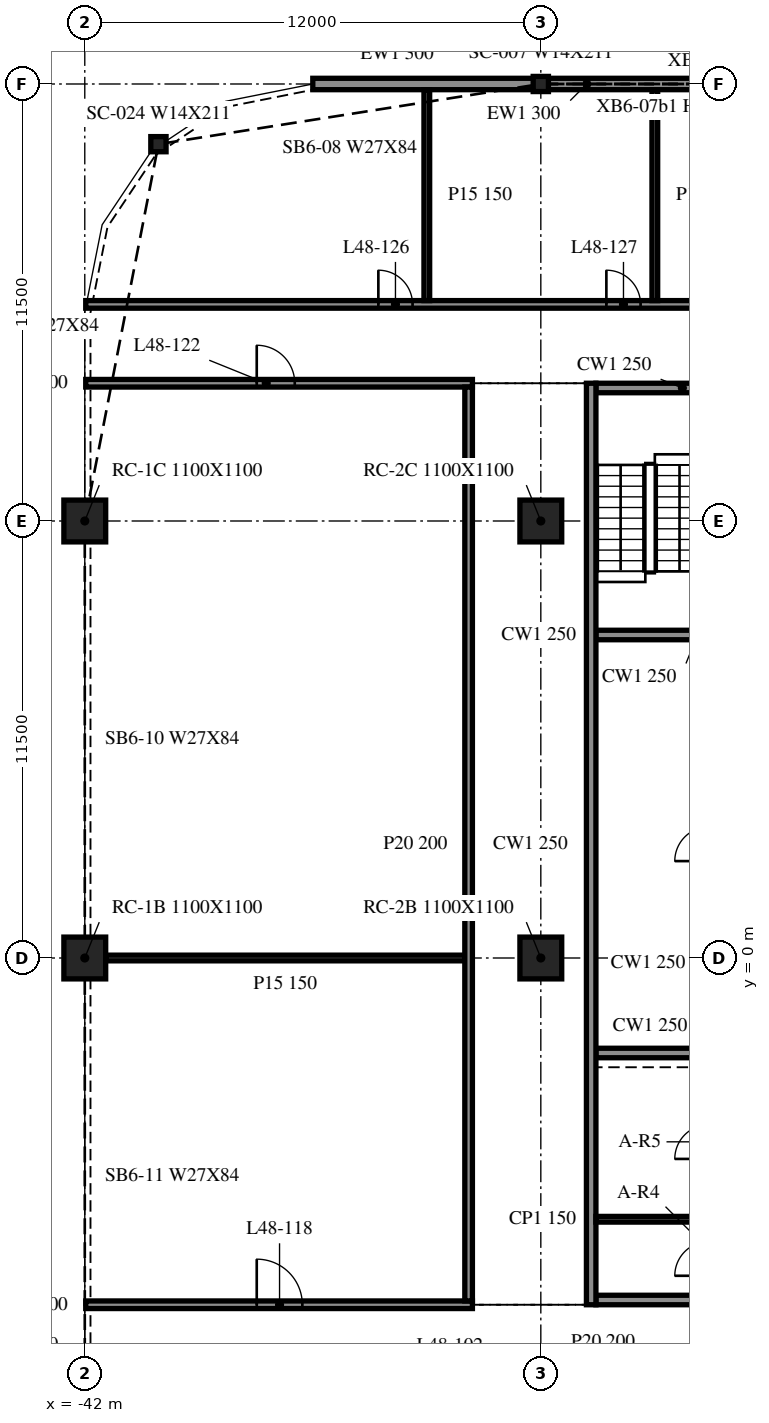
"""IFC4 building model, lengths in metres.
Left out: names, types, materials, properties, quantities, classifications, styles, units other than length and angle.
Written with IfcOpenShell. Run it as: python <this file> out.ifc"""

import sys

from ifc_helpers import new_model, si_unit, direction, frame, frame_2d, origin, origin_2d, place, context, subcontext, project, spatial, rectangle, i_section, extrude, element, fill, save


model = new_model("IFC4")
c1 = context("Model", 3, precision=1e-05, world=origin(), true_north=direction((0.0, 1.0)))
c2 = subcontext(c1, "Body", "Model", "MODEL_VIEW")
j1 = project(units=[si_unit("LENGTHUNIT", "METRE"), si_unit("PLANEANGLEUNIT", "RADIAN")], contexts=[c1])
p1 = place(None, origin())
s1 = spatial("IfcSite", under=j1, at=p1, CompositionType="ELEMENT")
p2 = place(p1, origin())
s2 = spatial("IfcBuilding", under=s1, at=p2, CompositionType="ELEMENT")
p3 = place(p2, frame((0.0, 0.0, 201.5)))
s3 = spatial("IfcBuildingStorey", under=s2, at=p3, CompositionType="ELEMENT", Elevation=201.5)
for number, where, z_axis, x_axis in (
    (1, (-42.0, 0.0, -0.34), (0.0, 0.0, 1.0), (1.0, 0.0, 0.0)),
    (2, (-42.0, 11.5, -0.34), (0.0, 0.0, 1.0), (1.0, 0.0, 0.0)),
    (3, (-30.0, 0.0, -0.34), (0.0, 0.0, 1.0), (1.0, 0.0, 0.0)),
    (4, (-30.0, 11.5, -0.34), (0.0, 0.0, 1.0), (1.0, 0.0, 0.0)),
):
    element("IfcColumn", number, at=place(p3, frame(where, z_axis=z_axis, x_axis=x_axis)), inside=s3, PredefinedType="COLUMN", context=c2, shape_type="SweptSolid", body=[
        extrude(rectangle(XDim=1.1, YDim=1.1, at=origin_2d()), origin(), (0.0, 0.0, 1.0), 3.8),
    ])
for number, where, z_axis, x_axis in (
    (5, (-30.0, 23.0, -0.34), (0.0, 0.0, 1.0), (1.0, 0.0, 0.0)),
    (6, (-40.062, 21.416, -0.34), (0.0, 0.0, 1.0), (1.0, 0.0, 0.0)),
):
    element("IfcColumn", number, at=place(p3, frame(where, z_axis=z_axis, x_axis=x_axis)), inside=s3, PredefinedType="COLUMN", context=c2, shape_type="SweptSolid", body=[
        extrude(i_section(OverallWidth=0.401, OverallDepth=0.399, WebThickness=0.025, FlangeThickness=0.04, at=origin_2d()), origin(), (0.0, 0.0, 1.0), 3.8),
    ])
p4 = place(p3, frame((-18.012, 23.0, 0.0), z_axis=(0.0, 0.0, 1.0), x_axis=(-1.0, 0.0, 0.0)))
e7 = element("IfcWall", 7, at=p4, inside=s3, PredefinedType="NOTDEFINED", context=c2, shape_type="SweptSolid", body=[
    extrude(rectangle(XDim=11.975, YDim=0.3, at=frame_2d((5.988, 0.0))), origin(), (0.0, 0.0, 1.0), 2.782),
])
p5 = place(p3, frame((-30.012, 23.0, 0.0), z_axis=(0.0, 0.0, 1.0), x_axis=(-1.0, 0.0, 0.0)))
e8 = element("IfcWall", 8, at=p5, inside=s3, PredefinedType="NOTDEFINED", context=c2, shape_type="SweptSolid", body=[
    extrude(rectangle(XDim=5.988, YDim=0.3, at=frame_2d((2.994, 0.0))), origin(), (0.0, 0.0, 1.0), 2.782),
])
p6 = place(p3, frame((-28.675, 15.125, 0.0), z_axis=(0.0, 0.0, 1.0), x_axis=(0.0, -1.0, 0.0)))
e9 = element("IfcWall", 9, at=p6, inside=s3, PredefinedType="SOLIDWALL", context=c2, shape_type="SweptSolid", body=[
    extrude(rectangle(XDim=24.25, YDim=0.25, at=frame_2d((12.125, 0.0))), origin(), (0.0, 0.0, 1.0), 3.46),
])
p7 = place(p3, frame((-19.45, -9.0, 0.0), z_axis=(0.0, 0.0, 1.0), x_axis=(-1.0, 0.0, 0.0)))
e10 = element("IfcWall", 10, at=p7, inside=s3, PredefinedType="SOLIDWALL", context=c2, shape_type="SweptSolid", body=[
    extrude(rectangle(XDim=9.1, YDim=0.25, at=frame_2d((4.55, 0.0))), origin(), (0.0, 0.0, 1.0), 3.46),
])
p8 = place(p7, frame((3.65, 0.0, 0.0)))
e11 = element("IfcOpeningElement", 11, at=p8, cuts=e10, PredefinedType="OPENING", context=c2, shape_type="SweptSolid", body=[
    extrude(rectangle(XDim=1.8, YDim=2.1, at=frame_2d((0.9, 1.05))), frame((0.0, 0.135, 0.0), z_axis=(0.0, -1.0, 0.0), x_axis=(1.0, 0.0, 0.0)), (0.0, 0.0, 1.0), 0.27),
])
p9 = place(p3, frame((-28.55, 15.0, 0.0), z_axis=(0.0, 0.0, 1.0), x_axis=(1.0, 0.0, 0.0)))
e12 = element("IfcWall", 12, at=p9, inside=s3, PredefinedType="SOLIDWALL", context=c2, shape_type="SweptSolid", body=[
    extrude(rectangle(XDim=9.1, YDim=0.25, at=frame_2d((4.55, 0.0))), origin(), (0.0, 0.0, 1.0), 3.46),
])
p10 = place(p9, frame((3.65, 0.0, 0.0)))
e13 = element("IfcOpeningElement", 13, at=p10, cuts=e12, PredefinedType="OPENING", context=c2, shape_type="SweptSolid", body=[
    extrude(rectangle(XDim=1.8, YDim=2.1, at=frame_2d((0.9, 1.05))), frame((0.0, 0.135, 0.0), z_axis=(0.0, -1.0, 0.0), x_axis=(1.0, 0.0, 0.0)), (0.0, 0.0, 1.0), 0.27),
])
for number, where, z_axis, x_axis in (
    (14, (-28.55, -2.5, 0.0), (0.0, 0.0, 1.0), (1.0, 0.0, 0.0)),
    (15, (-28.55, 8.5, 0.0), (0.0, 0.0, 1.0), (1.0, 0.0, 0.0)),
):
    element("IfcWall", number, at=place(p3, frame(where, z_axis=z_axis, x_axis=x_axis)), inside=s3, PredefinedType="SOLIDWALL", context=c2, shape_type="SweptSolid", body=[
        extrude(rectangle(XDim=2.85, YDim=0.25, at=frame_2d((1.425, 0.0))), origin(), (0.0, 0.0, 1.0), 3.46),
    ])
p11 = place(p3, frame((-28.55, -6.875, 0.0), z_axis=(0.0, 0.0, 1.0), x_axis=(1.0, 0.0, 0.0)))
e16 = element("IfcWall", 16, at=p11, inside=s3, PredefinedType="PARTITIONING", context=c2, shape_type="SweptSolid", body=[
    extrude(rectangle(XDim=2.85, YDim=0.15, at=frame_2d((1.425, 0.0))), origin(), (0.0, 0.0, 1.0), 3.46),
])
p12 = place(p3, frame((-41.975, -9.125, 0.0), z_axis=(0.0, 0.0, 1.0), x_axis=(1.0, 0.0, 0.0)))
e17 = element("IfcWall", 17, at=p12, inside=s3, PredefinedType="PARTITIONING", context=c2, shape_type="SweptSolid", body=[
    extrude(rectangle(XDim=10.175, YDim=0.2, at=frame_2d((5.087, 0.0))), origin(), (0.0, 0.0, 1.0), 3.46),
])
p13 = place(p12, frame((4.5, 0.0, 0.0)))
e18 = element("IfcOpeningElement", 18, at=p13, cuts=e17, PredefinedType="OPENING", context=c2, shape_type="SweptSolid", body=[
    extrude(rectangle(XDim=1.2, YDim=2.1, at=frame_2d((0.6, 1.05))), frame((0.0, 0.11, 0.0), z_axis=(0.0, -1.0, 0.0), x_axis=(1.0, 0.0, 0.0)), (0.0, 0.0, 1.0), 0.22),
])
p14 = place(p3, frame((-41.45, 0.0, 0.0), z_axis=(0.0, 0.0, 1.0), x_axis=(1.0, 0.0, 0.0)))
e19 = element("IfcWall", 19, at=p14, inside=s3, PredefinedType="PARTITIONING", context=c2, shape_type="SweptSolid", body=[
    extrude(rectangle(XDim=9.45, YDim=0.15, at=frame_2d((4.725, 0.0))), origin(), (0.0, 0.0, 1.0), 3.46),
])
p15 = place(p3, frame((-41.975, 15.125, 0.0), z_axis=(0.0, 0.0, 1.0), x_axis=(1.0, 0.0, 0.0)))
e20 = element("IfcWall", 20, at=p15, inside=s3, PredefinedType="PARTITIONING", context=c2, shape_type="SweptSolid", body=[
    extrude(rectangle(XDim=10.175, YDim=0.2, at=frame_2d((5.087, 0.0))), origin(), (0.0, 0.0, 1.0), 3.46),
])
p16 = place(p15, frame((4.5, 0.0, 0.0)))
e21 = element("IfcOpeningElement", 21, at=p16, cuts=e20, PredefinedType="OPENING", context=c2, shape_type="SweptSolid", body=[
    extrude(rectangle(XDim=1.0, YDim=2.1, at=frame_2d((0.5, 1.05))), frame((0.0, 0.11, 0.0), z_axis=(0.0, -1.0, 0.0), x_axis=(1.0, 0.0, 0.0)), (0.0, 0.0, 1.0), 0.22),
])
p17 = place(p3, frame((-41.975, 17.2, 0.0), z_axis=(0.0, 0.0, 1.0), x_axis=(1.0, 0.0, 0.0)))
e22 = element("IfcWall", 22, at=p17, inside=s3, PredefinedType="PARTITIONING", context=c2, shape_type="SweptSolid", body=[
    extrude(rectangle(XDim=95.782, YDim=0.2, at=frame_2d((47.891, 0.0))), origin(), (0.0, 0.0, 1.0), 3.46),
])
p18 = place(p17, frame((7.7, 0.0, 0.0)))
e23 = element("IfcOpeningElement", 23, at=p18, cuts=e22, PredefinedType="OPENING", context=c2, shape_type="SweptSolid", body=[
    extrude(rectangle(XDim=0.9, YDim=2.1, at=frame_2d((0.45, 1.05))), frame((0.0, 0.11, 0.0), z_axis=(0.0, -1.0, 0.0), x_axis=(1.0, 0.0, 0.0)), (0.0, 0.0, 1.0), 0.22),
])
p19 = place(p17, frame((13.7, 0.0, 0.0)))
e24 = element("IfcOpeningElement", 24, at=p19, cuts=e22, PredefinedType="OPENING", context=c2, shape_type="SweptSolid", body=[
    extrude(rectangle(XDim=0.9, YDim=2.1, at=frame_2d((0.45, 1.05))), frame((0.0, 0.11, 0.0), z_axis=(0.0, -1.0, 0.0), x_axis=(1.0, 0.0, 0.0)), (0.0, 0.0, 1.0), 0.22),
])
p20 = place(p17, frame((19.7, 0.0, 0.0)))
e25 = element("IfcOpeningElement", 25, at=p20, cuts=e22, PredefinedType="OPENING", context=c2, shape_type="SweptSolid", body=[
    extrude(rectangle(XDim=0.9, YDim=2.1, at=frame_2d((0.45, 1.05))), frame((0.0, 0.11, 0.0), z_axis=(0.0, -1.0, 0.0), x_axis=(1.0, 0.0, 0.0)), (0.0, 0.0, 1.0), 0.22),
])
p21 = place(p17, frame((31.7, 0.0, 0.0)))
e26 = element("IfcOpeningElement", 26, at=p21, cuts=e22, PredefinedType="OPENING", context=c2, shape_type="SweptSolid", body=[
    extrude(rectangle(XDim=0.9, YDim=2.1, at=frame_2d((0.45, 1.05))), frame((0.0, 0.11, 0.0), z_axis=(0.0, -1.0, 0.0), x_axis=(1.0, 0.0, 0.0)), (0.0, 0.0, 1.0), 0.22),
])
p22 = place(p17, frame((35.1, 0.0, 0.0)))
e27 = element("IfcOpeningElement", 27, at=p22, cuts=e22, PredefinedType="OPENING", context=c2, shape_type="SweptSolid", body=[
    extrude(rectangle(XDim=0.9, YDim=2.1, at=frame_2d((0.45, 1.05))), frame((0.0, 0.11, 0.0), z_axis=(0.0, -1.0, 0.0), x_axis=(1.0, 0.0, 0.0)), (0.0, 0.0, 1.0), 0.22),
])
p23 = place(p17, frame((43.7, 0.0, 0.0)))
e28 = element("IfcOpeningElement", 28, at=p23, cuts=e22, PredefinedType="OPENING", context=c2, shape_type="SweptSolid", body=[
    extrude(rectangle(XDim=0.9, YDim=2.1, at=frame_2d((0.45, 1.05))), frame((0.0, 0.11, 0.0), z_axis=(0.0, -1.0, 0.0), x_axis=(1.0, 0.0, 0.0)), (0.0, 0.0, 1.0), 0.22),
])
p24 = place(p17, frame((47.3, 0.0, 0.0)))
e29 = element("IfcOpeningElement", 29, at=p24, cuts=e22, PredefinedType="OPENING", context=c2, shape_type="SweptSolid", body=[
    extrude(rectangle(XDim=0.9, YDim=2.1, at=frame_2d((0.45, 1.05))), frame((0.0, 0.11, 0.0), z_axis=(0.0, -1.0, 0.0), x_axis=(1.0, 0.0, 0.0)), (0.0, 0.0, 1.0), 0.22),
])
p25 = place(p17, frame((51.5, 0.0, 0.0)))
e30 = element("IfcOpeningElement", 30, at=p25, cuts=e22, PredefinedType="OPENING", context=c2, shape_type="SweptSolid", body=[
    extrude(rectangle(XDim=0.9, YDim=2.1, at=frame_2d((0.45, 1.05))), frame((0.0, 0.11, 0.0), z_axis=(0.0, -1.0, 0.0), x_axis=(1.0, 0.0, 0.0)), (0.0, 0.0, 1.0), 0.22),
])
p26 = place(p17, frame((57.1, 0.0, 0.0)))
e31 = element("IfcOpeningElement", 31, at=p26, cuts=e22, PredefinedType="OPENING", context=c2, shape_type="SweptSolid", body=[
    extrude(rectangle(XDim=0.9, YDim=2.1, at=frame_2d((0.45, 1.05))), frame((0.0, 0.11, 0.0), z_axis=(0.0, -1.0, 0.0), x_axis=(1.0, 0.0, 0.0)), (0.0, 0.0, 1.0), 0.22),
])
p27 = place(p17, frame((69.1, 0.0, 0.0)))
e32 = element("IfcOpeningElement", 32, at=p27, cuts=e22, PredefinedType="OPENING", context=c2, shape_type="SweptSolid", body=[
    extrude(rectangle(XDim=0.9, YDim=2.1, at=frame_2d((0.45, 1.05))), frame((0.0, 0.11, 0.0), z_axis=(0.0, -1.0, 0.0), x_axis=(1.0, 0.0, 0.0)), (0.0, 0.0, 1.0), 0.22),
])
p28 = place(p17, frame((72.5, 0.0, 0.0)))
e33 = element("IfcOpeningElement", 33, at=p28, cuts=e22, PredefinedType="OPENING", context=c2, shape_type="SweptSolid", body=[
    extrude(rectangle(XDim=0.9, YDim=2.1, at=frame_2d((0.45, 1.05))), frame((0.0, 0.11, 0.0), z_axis=(0.0, -1.0, 0.0), x_axis=(1.0, 0.0, 0.0)), (0.0, 0.0, 1.0), 0.22),
])
p29 = place(p17, frame((81.1, 0.0, 0.0)))
e34 = element("IfcOpeningElement", 34, at=p29, cuts=e22, PredefinedType="OPENING", context=c2, shape_type="SweptSolid", body=[
    extrude(rectangle(XDim=0.9, YDim=2.1, at=frame_2d((0.45, 1.05))), frame((0.0, 0.11, 0.0), z_axis=(0.0, -1.0, 0.0), x_axis=(1.0, 0.0, 0.0)), (0.0, 0.0, 1.0), 0.22),
])
p30 = place(p17, frame((87.1, 0.0, 0.0)))
e35 = element("IfcOpeningElement", 35, at=p30, cuts=e22, PredefinedType="OPENING", context=c2, shape_type="SweptSolid", body=[
    extrude(rectangle(XDim=0.9, YDim=2.1, at=frame_2d((0.45, 1.05))), frame((0.0, 0.11, 0.0), z_axis=(0.0, -1.0, 0.0), x_axis=(1.0, 0.0, 0.0)), (0.0, 0.0, 1.0), 0.22),
])
p31 = place(p3, frame((-33.0, 17.3, 0.0), z_axis=(0.0, 0.0, 1.0), x_axis=(0.0, 1.0, 0.0)))
e36 = element("IfcWall", 36, at=p31, inside=s3, PredefinedType="PARTITIONING", context=c2, shape_type="SweptSolid", body=[
    extrude(rectangle(XDim=5.55, YDim=0.15, at=frame_2d((2.775, 0.0))), origin(), (0.0, 0.0, 1.0), 3.46),
])
p32 = place(p3, frame((-31.9, -9.025, 0.0), z_axis=(0.0, 0.0, 1.0), x_axis=(0.0, 1.0, 0.0)))
e37 = element("IfcWall", 37, at=p32, inside=s3, PredefinedType="PARTITIONING", context=c2, shape_type="SweptSolid", body=[
    extrude(rectangle(XDim=24.05, YDim=0.2, at=frame_2d((12.025, 0.0))), origin(), (0.0, 0.0, 1.0), 3.46),
])
p33 = place(p3, frame((-27.0, 17.3, 0.0), z_axis=(0.0, 0.0, 1.0), x_axis=(0.0, 1.0, 0.0)))
e38 = element("IfcWall", 38, at=p33, inside=s3, PredefinedType="PARTITIONING", context=c2, shape_type="SweptSolid", body=[
    extrude(rectangle(XDim=5.55, YDim=0.15, at=frame_2d((2.775, 0.0))), origin(), (0.0, 0.0, 1.0), 3.46),
])
p34 = place(p13, origin())
e39 = element("IfcDoor", 39, at=p34, inside=s3, OperationType="SINGLE_SWING_RIGHT", PredefinedType="DOOR", context=c2, shape_type="SweptSolid", body=[
    extrude(rectangle(XDim=1.2, YDim=2.1, at=frame_2d((0.6, 1.05))), frame((0.0, 0.025, 0.0), z_axis=(0.0, -1.0, 0.0), x_axis=(1.0, 0.0, 0.0)), (0.0, 0.0, 1.0), 0.05),
])
fill(e18, e39)
p35 = place(p16, origin())
e40 = element("IfcDoor", 40, at=p35, inside=s3, OperationType="SINGLE_SWING_RIGHT", PredefinedType="DOOR", context=c2, shape_type="SweptSolid", body=[
    extrude(rectangle(XDim=1.0, YDim=2.1, at=frame_2d((0.5, 1.05))), frame((0.0, 0.025, 0.0), z_axis=(0.0, -1.0, 0.0), x_axis=(1.0, 0.0, 0.0)), (0.0, 0.0, 1.0), 0.05),
])
fill(e21, e40)
p36 = place(p18, origin())
e41 = element("IfcDoor", 41, at=p36, inside=s3, OperationType="SINGLE_SWING_LEFT", PredefinedType="DOOR", context=c2, shape_type="SweptSolid", body=[
    extrude(rectangle(XDim=0.9, YDim=2.1, at=frame_2d((0.45, 1.05))), frame((0.0, 0.025, 0.0), z_axis=(0.0, -1.0, 0.0), x_axis=(1.0, 0.0, 0.0)), (0.0, 0.0, 1.0), 0.05),
])
fill(e23, e41)
p37 = place(p19, origin())
e42 = element("IfcDoor", 42, at=p37, inside=s3, OperationType="SINGLE_SWING_LEFT", PredefinedType="DOOR", context=c2, shape_type="SweptSolid", body=[
    extrude(rectangle(XDim=0.9, YDim=2.1, at=frame_2d((0.45, 1.05))), frame((0.0, 0.025, 0.0), z_axis=(0.0, -1.0, 0.0), x_axis=(1.0, 0.0, 0.0)), (0.0, 0.0, 1.0), 0.05),
])
fill(e24, e42)
save(model, sys.argv[1])
